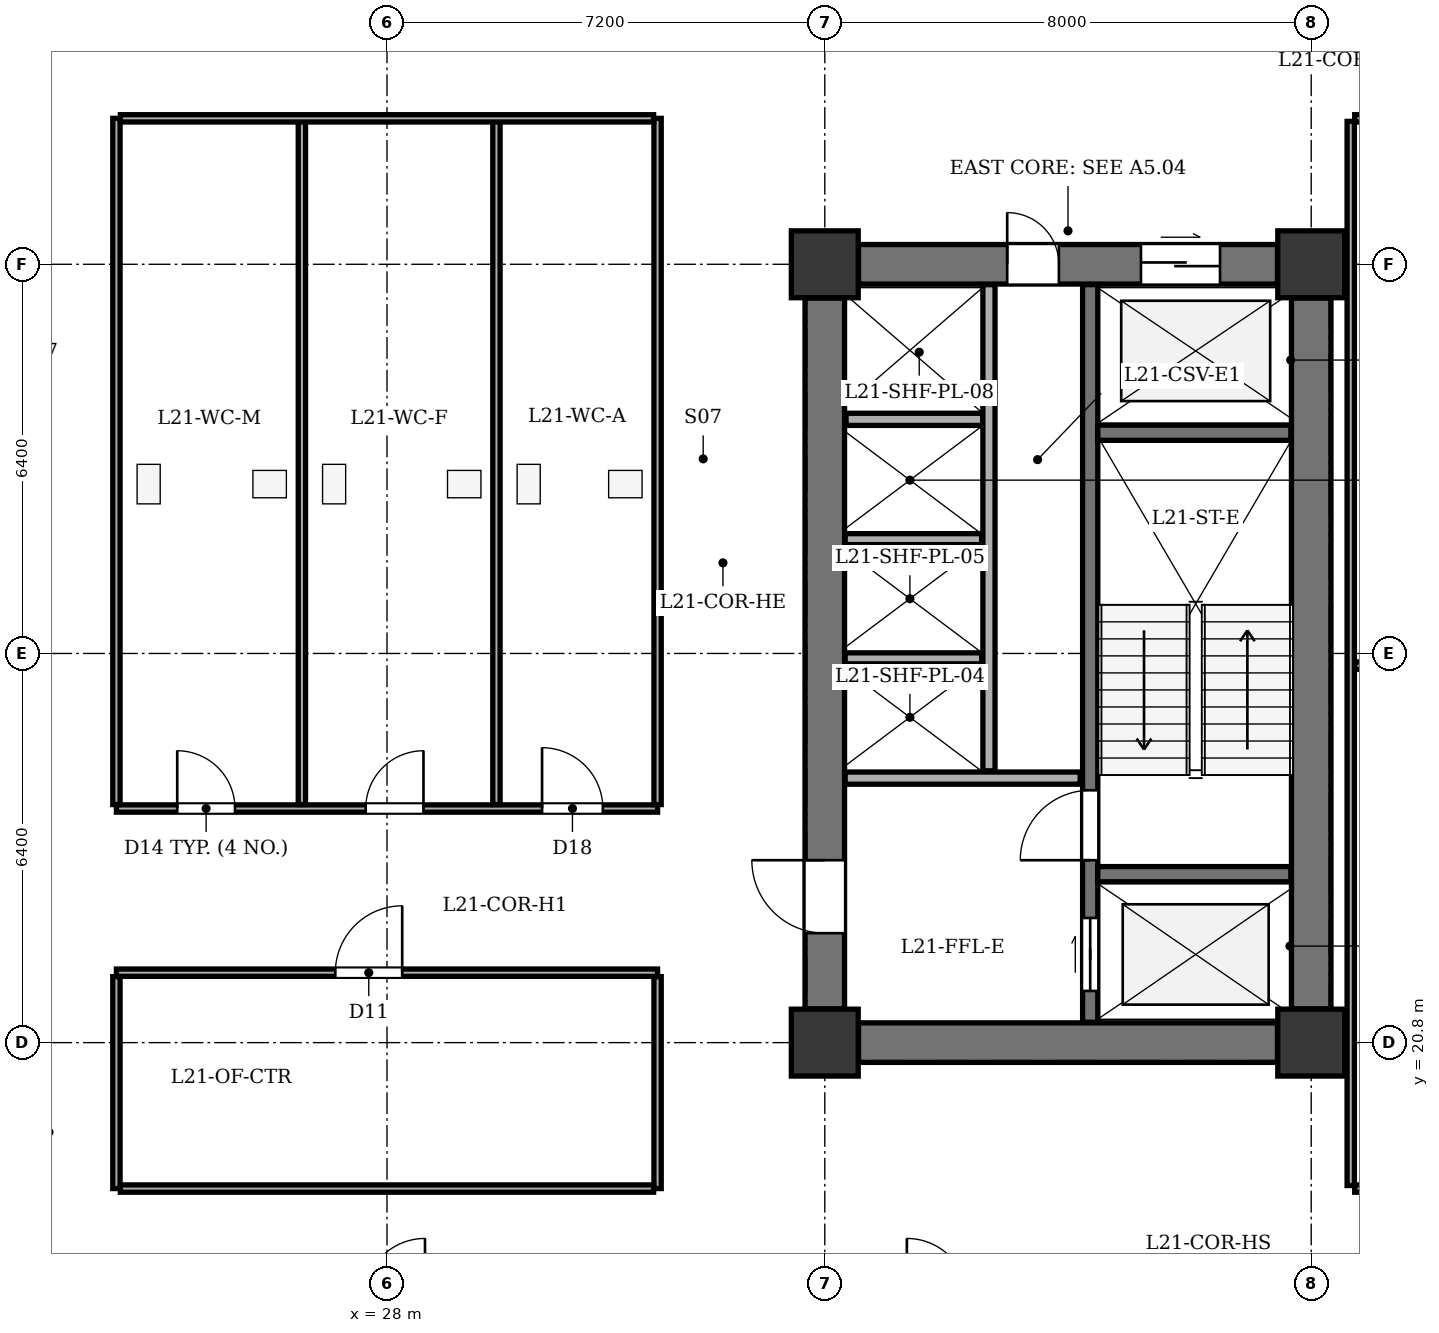
"""IFC4 building model, lengths in metres.
Left out: names, types, materials, properties, quantities, classifications, styles, units other than length and angle.
Written with IfcOpenShell. Run it as: python <this file> out.ifc"""

import sys

from ifc_helpers import new_model, si_unit, direction, frame, frame_2d, origin, origin_2d, place, context, subcontext, project, spatial, rectangle, extrude, element, fill, save


model = new_model("IFC4")
c1 = context("Model", 3, precision=1e-05, world=origin(), true_north=direction((0.0, 1.0)))
c2 = subcontext(c1, "Body", "Model", "MODEL_VIEW")
j1 = project(units=[si_unit("LENGTHUNIT", "METRE"), si_unit("PLANEANGLEUNIT", "RADIAN")], contexts=[c1])
p1 = place(None, origin())
s1 = spatial("IfcSite", under=j1, at=p1, CompositionType="ELEMENT")
p2 = place(p1, origin())
s2 = spatial("IfcBuilding", under=s1, at=p2, CompositionType="ELEMENT")
p3 = place(p2, frame((0.0, 0.0, 86.7)))
s3 = spatial("IfcBuildingStorey", under=s2, at=p3, CompositionType="ELEMENT", Elevation=86.7)
for number, where, z_axis, x_axis in (
    (1, (35.2, 20.8, 0.0), (0.0, 0.0, 1.0), (1.0, 0.0, 0.0)),
    (2, (43.2, 20.8, 0.0), (0.0, 0.0, 1.0), (1.0, 0.0, 0.0)),
    (3, (35.2, 33.6, 0.0), (0.0, 0.0, 1.0), (1.0, 0.0, 0.0)),
    (4, (43.2, 33.6, 0.0), (0.0, 0.0, 1.0), (1.0, 0.0, 0.0)),
):
    element("IfcColumn", number, at=place(p3, frame(where, z_axis=z_axis, x_axis=x_axis)), inside=s3, PredefinedType="COLUMN", context=c2, shape_type="SweptSolid", body=[
        extrude(rectangle(XDim=1.1, YDim=1.1, at=origin_2d()), origin(), (0.0, 0.0, 1.0), 3.9),
    ])
p4 = place(p3, frame((43.2, 21.355, 0.0), z_axis=(0.0, 0.0, 1.0), x_axis=(0.0, 1.0, 0.0)))
e5 = element("IfcWall", 5, at=p4, inside=s3, PredefinedType="SHEAR", context=c2, shape_type="SweptSolid", body=[
    extrude(rectangle(XDim=11.69, YDim=0.65, at=frame_2d((5.845, 0.0))), origin(), (0.0, 0.0, 1.0), 3.6),
])
p5 = place(p3, frame((35.755, 20.8, 0.0), z_axis=(0.0, 0.0, 1.0), x_axis=(1.0, 0.0, 0.0)))
e6 = element("IfcWall", 6, at=p5, inside=s3, PredefinedType="SHEAR", context=c2, shape_type="SweptSolid", body=[
    extrude(rectangle(XDim=6.89, YDim=0.65, at=frame_2d((3.445, 0.0))), origin(), (0.0, 0.0, 1.0), 3.6),
])
p6 = place(p3, frame((35.755, 33.6, 0.0), z_axis=(0.0, 0.0, 1.0), x_axis=(1.0, 0.0, 0.0)))
e7 = element("IfcWall", 7, at=p6, inside=s3, PredefinedType="SHEAR", context=c2, shape_type="SweptSolid", body=[
    extrude(rectangle(XDim=6.89, YDim=0.65, at=frame_2d((3.445, 0.0))), origin(), (0.0, 0.0, 1.0), 3.6),
])
p7 = place(p6, frame((4.645, 0.0, 0.0)))
e8 = element("IfcOpeningElement", 8, at=p7, cuts=e7, PredefinedType="OPENING", context=c2, shape_type="SweptSolid", body=[
    extrude(rectangle(XDim=1.3, YDim=2.15, at=frame_2d((0.65, 1.075))), frame((0.0, 0.335, 0.0), z_axis=(0.0, -1.0, 0.0), x_axis=(1.0, 0.0, 0.0)), (0.0, 0.0, 1.0), 0.67),
])
p8 = place(p6, frame((2.445, 0.0, 0.0)))
e9 = element("IfcOpeningElement", 9, at=p8, cuts=e7, PredefinedType="OPENING", context=c2, shape_type="SweptSolid", body=[
    extrude(rectangle(XDim=0.85, YDim=2.02, at=frame_2d((0.425, 1.01))), frame((0.0, 0.335, 0.0), z_axis=(0.0, -1.0, 0.0), x_axis=(1.0, 0.0, 0.0)), (0.0, 0.0, 1.0), 0.67),
])
p9 = place(p3, frame((35.2, 21.355, 0.0), z_axis=(0.0, 0.0, 1.0), x_axis=(0.0, 1.0, 0.0)))
e10 = element("IfcWall", 10, at=p9, inside=s3, PredefinedType="SHEAR", context=c2, shape_type="SweptSolid", body=[
    extrude(rectangle(XDim=11.69, YDim=0.65, at=frame_2d((5.845, 0.0))), origin(), (0.0, 0.0, 1.0), 3.6),
])
p10 = place(p9, frame((1.245, 0.0, 0.0)))
e11 = element("IfcOpeningElement", 11, at=p10, cuts=e10, PredefinedType="OPENING", context=c2, shape_type="SweptSolid", body=[
    extrude(rectangle(XDim=1.2, YDim=2.15, at=frame_2d((0.6, 1.075))), frame((0.0, 0.335, 0.0), z_axis=(0.0, -1.0, 0.0), x_axis=(1.0, 0.0, 0.0)), (0.0, 0.0, 1.0), 0.67),
])
p11 = place(p3, frame((39.565, 21.135, 0.0), z_axis=(0.0, 0.0, 1.0), x_axis=(0.0, 1.0, 0.0)))
e12 = element("IfcWall", 12, at=p11, inside=s3, PredefinedType="SHEAR", context=c2, shape_type="SweptSolid", body=[
    extrude(rectangle(XDim=12.13, YDim=0.25, at=frame_2d((6.065, 0.0))), origin(), (0.0, 0.0, 1.0), 3.6),
])
p12 = place(p11, frame((0.515, 0.0, 0.0)))
e13 = element("IfcOpeningElement", 13, at=p12, cuts=e12, PredefinedType="OPENING", context=c2, shape_type="SweptSolid", body=[
    extrude(rectangle(XDim=1.2, YDim=2.15, at=frame_2d((0.6, 1.075))), frame((0.0, 0.135, 0.0), z_axis=(0.0, -1.0, 0.0), x_axis=(1.0, 0.0, 0.0)), (0.0, 0.0, 1.0), 0.27),
])
p13 = place(p11, frame((2.665, 0.0, 0.0)))
e14 = element("IfcOpeningElement", 14, at=p13, cuts=e12, PredefinedType="OPENING", context=c2, shape_type="SweptSolid", body=[
    extrude(rectangle(XDim=1.15, YDim=2.15, at=frame_2d((0.575, 1.075))), frame((0.0, 0.135, 0.0), z_axis=(0.0, -1.0, 0.0), x_axis=(1.0, 0.0, 0.0)), (0.0, 0.0, 1.0), 0.27),
])
for number, where, z_axis, x_axis in (
    (15, (39.69, 23.57, 0.0), (0.0, 0.0, 1.0), (1.0, 0.0, 0.0)),
    (16, (39.69, 30.83, 0.0), (0.0, 0.0, 1.0), (1.0, 0.0, 0.0)),
):
    element("IfcWall", number, at=place(p3, frame(where, z_axis=z_axis, x_axis=x_axis)), inside=s3, PredefinedType="SHEAR", context=c2, shape_type="SweptSolid", body=[
        extrude(rectangle(XDim=3.175, YDim=0.25, at=frame_2d((1.587, 0.0))), origin(), (0.0, 0.0, 1.0), 3.6),
    ])
p14 = place(p3, frame((35.535, 25.15, 0.0), z_axis=(0.0, 0.0, 1.0), x_axis=(1.0, 0.0, 0.0)))
e17 = element("IfcWall", 17, at=p14, inside=s3, PredefinedType="SOLIDWALL", context=c2, shape_type="SweptSolid", body=[
    extrude(rectangle(XDim=3.865, YDim=0.2, at=frame_2d((1.933, 0.0))), origin(), (0.0, 0.0, 1.0), 3.6),
])
p15 = place(p3, frame((35.55, 31.05, 0.0), z_axis=(0.0, 0.0, 1.0), x_axis=(1.0, 0.0, 0.0)))
e18 = element("IfcWall", 18, at=p15, inside=s3, PredefinedType="SOLIDWALL", context=c2, shape_type="SweptSolid", body=[
    extrude(rectangle(XDim=2.25, YDim=0.2, at=frame_2d((1.125, 0.0))), origin(), (0.0, 0.0, 1.0), 3.6),
])
p16 = place(p3, frame((37.9, 25.27, 0.0), z_axis=(0.0, 0.0, 1.0), x_axis=(0.0, 1.0, 0.0)))
e19 = element("IfcWall", 19, at=p16, inside=s3, PredefinedType="SOLIDWALL", context=c2, shape_type="SweptSolid", body=[
    extrude(rectangle(XDim=7.995, YDim=0.2, at=frame_2d((3.998, 0.0))), origin(), (0.0, 0.0, 1.0), 3.6),
])
for number, where, z_axis, x_axis in (
    (20, (35.535, 27.12, 0.0), (0.0, 0.0, 1.0), (1.0, 0.0, 0.0)),
    (21, (35.535, 29.08, 0.0), (0.0, 0.0, 1.0), (1.0, 0.0, 0.0)),
):
    element("IfcWall", number, at=place(p3, frame(where, z_axis=z_axis, x_axis=x_axis)), inside=s3, PredefinedType="PARTITIONING", context=c2, shape_type="SweptSolid", body=[
        extrude(rectangle(XDim=2.245, YDim=0.18, at=frame_2d((1.123, 0.0))), origin(), (0.0, 0.0, 1.0), 3.6),
    ])
p17 = place(p3, frame((23.55, 24.65, 0.0), z_axis=(0.0, 0.0, 1.0), x_axis=(1.0, 0.0, 0.0)))
e22 = element("IfcWall", 22, at=p17, inside=s3, PredefinedType="PARTITIONING", context=c2, shape_type="SweptSolid", body=[
    extrude(rectangle(XDim=8.9, YDim=0.12, at=frame_2d((4.45, 0.0))), origin(), (0.0, 0.0, 1.0), 3.135),
])
p18 = place(p17, frame((1.0, 0.0, 0.0)))
e23 = element("IfcOpeningElement", 23, at=p18, cuts=e22, PredefinedType="OPENING", context=c2, shape_type="SweptSolid", body=[
    extrude(rectangle(XDim=0.95, YDim=2.1, at=frame_2d((0.475, 1.05))), frame((0.0, 0.07, 0.0), z_axis=(0.0, -1.0, 0.0), x_axis=(1.0, 0.0, 0.0)), (0.0, 0.0, 1.0), 0.14),
])
p19 = place(p17, frame((4.1, 0.0, 0.0)))
e24 = element("IfcOpeningElement", 24, at=p19, cuts=e22, PredefinedType="OPENING", context=c2, shape_type="SweptSolid", body=[
    extrude(rectangle(XDim=0.95, YDim=2.1, at=frame_2d((0.475, 1.05))), frame((0.0, 0.07, 0.0), z_axis=(0.0, -1.0, 0.0), x_axis=(1.0, 0.0, 0.0)), (0.0, 0.0, 1.0), 0.14),
])
p20 = place(p17, frame((7.0, 0.0, 0.0)))
e25 = element("IfcOpeningElement", 25, at=p20, cuts=e22, PredefinedType="OPENING", context=c2, shape_type="SweptSolid", body=[
    extrude(rectangle(XDim=1.0, YDim=2.1, at=frame_2d((0.5, 1.05))), frame((0.0, 0.07, 0.0), z_axis=(0.0, -1.0, 0.0), x_axis=(1.0, 0.0, 0.0)), (0.0, 0.0, 1.0), 0.14),
])
for number, where, z_axis, x_axis in (
    (26, (23.55, 24.715, 0.0), (0.0, 0.0, 1.0), (0.0, 1.0, 0.0)),
    (27, (32.45, 24.715, 0.0), (0.0, 0.0, 1.0), (0.0, 1.0, 0.0)),
    (28, (26.6, 24.715, 0.0), (0.0, 0.0, 1.0), (0.0, 1.0, 0.0)),
):
    element("IfcWall", number, at=place(p3, frame(where, z_axis=z_axis, x_axis=x_axis)), inside=s3, PredefinedType="PARTITIONING", context=c2, shape_type="SweptSolid", body=[
        extrude(rectangle(XDim=11.285, YDim=0.12, at=frame_2d((5.643, 0.0))), origin(), (0.0, 0.0, 1.0), 3.6),
    ])
p21 = place(p3, frame((29.8, 24.715, 0.0), z_axis=(0.0, 0.0, 1.0), x_axis=(0.0, 1.0, 0.0)))
e29 = element("IfcWall", 29, at=p21, inside=s3, PredefinedType="PARTITIONING", context=c2, shape_type="SweptSolid", body=[
    extrude(rectangle(XDim=11.285, YDim=0.12, at=frame_2d((5.643, 0.0))), origin(), (0.0, 0.0, 1.0), 3.135),
])
p22 = place(p3, frame((23.615, 36.0, 0.0), z_axis=(0.0, 0.0, 1.0), x_axis=(1.0, 0.0, 0.0)))
e30 = element("IfcWall", 30, at=p22, inside=s3, PredefinedType="PARTITIONING", context=c2, shape_type="SweptSolid", body=[
    extrude(rectangle(XDim=8.77, YDim=0.12, at=frame_2d((4.385, 0.0))), origin(), (0.0, 0.0, 1.0), 3.6),
])
p23 = place(p3, frame((23.55, 21.95, 0.0), z_axis=(0.0, 0.0, 1.0), x_axis=(1.0, 0.0, 0.0)))
e31 = element("IfcWall", 31, at=p23, inside=s3, PredefinedType="PARTITIONING", context=c2, shape_type="SweptSolid", body=[
    extrude(rectangle(XDim=8.9, YDim=0.12, at=frame_2d((4.45, 0.0))), origin(), (0.0, 0.0, 1.0), 3.135),
])
p24 = place(p23, frame((3.6, 0.0, 0.0)))
e32 = element("IfcOpeningElement", 32, at=p24, cuts=e31, PredefinedType="OPENING", context=c2, shape_type="SweptSolid", body=[
    extrude(rectangle(XDim=1.1, YDim=2.15, at=frame_2d((0.55, 1.075))), frame((0.0, 0.07, 0.0), z_axis=(0.0, -1.0, 0.0), x_axis=(1.0, 0.0, 0.0)), (0.0, 0.0, 1.0), 0.14),
])
for number, where, z_axis, x_axis in (
    (33, (23.55, 18.4, 0.0), (0.0, 0.0, 1.0), (0.0, 1.0, 0.0)),
    (34, (32.45, 18.4, 0.0), (0.0, 0.0, 1.0), (0.0, 1.0, 0.0)),
):
    element("IfcWall", number, at=place(p3, frame(where, z_axis=z_axis, x_axis=x_axis)), inside=s3, PredefinedType="PARTITIONING", context=c2, shape_type="SweptSolid", body=[
        extrude(rectangle(XDim=3.485, YDim=0.12, at=frame_2d((1.743, 0.0))), origin(), (0.0, 0.0, 1.0), 3.6),
    ])
p25 = place(p3, frame((23.615, 18.4, 0.0), z_axis=(0.0, 0.0, 1.0), x_axis=(1.0, 0.0, 0.0)))
e35 = element("IfcWall", 35, at=p25, inside=s3, PredefinedType="PARTITIONING", context=c2, shape_type="SweptSolid", body=[
    extrude(rectangle(XDim=8.77, YDim=0.12, at=frame_2d((4.385, 0.0))), origin(), (0.0, 0.0, 1.0), 3.6),
])
p26 = place(p3, frame((43.85, 18.45, 0.0), z_axis=(0.0, 0.0, 1.0), x_axis=(0.0, 1.0, 0.0)))
e36 = element("IfcWall", 36, at=p26, inside=s3, PredefinedType="PARTITIONING", context=c2, shape_type="SweptSolid", body=[
    extrude(rectangle(XDim=17.5, YDim=0.12, at=frame_2d((8.75, 0.0))), origin(), (0.0, 0.0, 1.0), 3.6),
])
p27 = place(p3, frame((43.915, 18.4, 0.0), z_axis=(0.0, 0.0, 1.0), x_axis=(1.0, 0.0, 0.0)))
e37 = element("IfcWall", 37, at=p27, inside=s3, PredefinedType="PARTITIONING", context=c2, shape_type="SweptSolid", body=[
    extrude(rectangle(XDim=11.38, YDim=0.12, at=frame_2d((5.69, 0.0))), origin(), (0.0, 0.0, 1.0), 3.6),
])
p28 = place(p27, frame((1.485, 0.0, 0.0)))
e38 = element("IfcOpeningElement", 38, at=p28, cuts=e37, PredefinedType="OPENING", context=c2, shape_type="SweptSolid", body=[
    extrude(rectangle(XDim=0.95, YDim=2.1, at=frame_2d((0.475, 1.05))), frame((0.0, 0.07, 0.0), z_axis=(0.0, -1.0, 0.0), x_axis=(1.0, 0.0, 0.0)), (0.0, 0.0, 1.0), 0.14),
])
p29 = place(p3, frame((43.915, 36.0, 0.0), z_axis=(0.0, 0.0, 1.0), x_axis=(1.0, 0.0, 0.0)))
e39 = element("IfcWall", 39, at=p29, inside=s3, PredefinedType="PARTITIONING", context=c2, shape_type="SweptSolid", body=[
    extrude(rectangle(XDim=11.38, YDim=0.12, at=frame_2d((5.69, 0.0))), origin(), (0.0, 0.0, 1.0), 3.6),
])
p30 = place(p29, frame((1.485, 0.0, 0.0)))
e40 = element("IfcOpeningElement", 40, at=p30, cuts=e39, PredefinedType="OPENING", context=c2, shape_type="SweptSolid", body=[
    extrude(rectangle(XDim=0.95, YDim=2.1, at=frame_2d((0.475, 1.05))), frame((0.0, 0.07, 0.0), z_axis=(0.0, -1.0, 0.0), x_axis=(1.0, 0.0, 0.0)), (0.0, 0.0, 1.0), 0.14),
])
p31 = place(p3, frame((43.915, 27.0, 0.0), z_axis=(0.0, 0.0, 1.0), x_axis=(1.0, 0.0, 0.0)))
e41 = element("IfcWall", 41, at=p31, inside=s3, PredefinedType="PARTITIONING", context=c2, shape_type="SweptSolid", body=[
    extrude(rectangle(XDim=11.38, YDim=0.12, at=frame_2d((5.69, 0.0))), origin(), (0.0, 0.0, 1.0), 3.6),
])
p32 = place(p31, frame((1.985, 0.0, 0.0)))
e42 = element("IfcOpeningElement", 42, at=p32, cuts=e41, PredefinedType="OPENING", context=c2, shape_type="SweptSolid", body=[
    extrude(rectangle(XDim=0.9, YDim=2.05, at=frame_2d((0.45, 1.025))), frame((0.0, 0.07, 0.0), z_axis=(0.0, -1.0, 0.0), x_axis=(1.0, 0.0, 0.0)), (0.0, 0.0, 1.0), 0.14),
])
p33 = place(p7, origin())
e43 = element("IfcDoor", 43, at=p33, inside=s3, OperationType="DOUBLE_DOOR_SLIDING", PredefinedType="DOOR", context=c2, shape_type="SweptSolid", body=[
    extrude(rectangle(XDim=1.3, YDim=2.15, at=frame_2d((0.65, 1.075))), frame((0.0, 0.025, 0.0), z_axis=(0.0, -1.0, 0.0), x_axis=(1.0, 0.0, 0.0)), (0.0, 0.0, 1.0), 0.05),
])
fill(e8, e43)
p34 = place(p8, origin())
e44 = element("IfcDoor", 44, at=p34, inside=s3, OperationType="SINGLE_SWING_LEFT", PredefinedType="DOOR", context=c2, shape_type="SweptSolid", body=[
    extrude(rectangle(XDim=0.85, YDim=2.02, at=frame_2d((0.425, 1.01))), frame((0.0, 0.025, 0.0), z_axis=(0.0, -1.0, 0.0), x_axis=(1.0, 0.0, 0.0)), (0.0, 0.0, 1.0), 0.05),
])
fill(e9, e44)
p35 = place(p10, origin())
e45 = element("IfcDoor", 45, at=p35, inside=s3, OperationType="SINGLE_SWING_RIGHT", PredefinedType="DOOR", context=c2, shape_type="SweptSolid", body=[
    extrude(rectangle(XDim=1.2, YDim=2.15, at=frame_2d((0.6, 1.075))), frame((0.0, 0.025, 0.0), z_axis=(0.0, -1.0, 0.0), x_axis=(1.0, 0.0, 0.0)), (0.0, 0.0, 1.0), 0.05),
])
fill(e11, e45)
p36 = place(p12, origin())
e46 = element("IfcDoor", 46, at=p36, inside=s3, OperationType="DOUBLE_DOOR_SLIDING", PredefinedType="DOOR", context=c2, shape_type="SweptSolid", body=[
    extrude(rectangle(XDim=1.2, YDim=2.15, at=frame_2d((0.6, 1.075))), frame((0.0, 0.025, 0.0), z_axis=(0.0, -1.0, 0.0), x_axis=(1.0, 0.0, 0.0)), (0.0, 0.0, 1.0), 0.05),
])
fill(e13, e46)
p37 = place(p13, origin())
e47 = element("IfcDoor", 47, at=p37, inside=s3, OperationType="SINGLE_SWING_LEFT", PredefinedType="DOOR", context=c2, shape_type="SweptSolid", body=[
    extrude(rectangle(XDim=1.15, YDim=2.15, at=frame_2d((0.575, 1.075))), frame((0.0, 0.025, 0.0), z_axis=(0.0, -1.0, 0.0), x_axis=(1.0, 0.0, 0.0)), (0.0, 0.0, 1.0), 0.05),
])
fill(e14, e47)
p38 = place(p18, origin())
e48 = element("IfcDoor", 48, at=p38, inside=s3, OperationType="SINGLE_SWING_LEFT", PredefinedType="DOOR", context=c2, shape_type="SweptSolid", body=[
    extrude(rectangle(XDim=0.95, YDim=2.1, at=frame_2d((0.475, 1.05))), frame((0.0, 0.025, 0.0), z_axis=(0.0, -1.0, 0.0), x_axis=(1.0, 0.0, 0.0)), (0.0, 0.0, 1.0), 0.05),
])
fill(e23, e48)
p39 = place(p19, origin())
e49 = element("IfcDoor", 49, at=p39, inside=s3, OperationType="SINGLE_SWING_RIGHT", PredefinedType="DOOR", context=c2, shape_type="SweptSolid", body=[
    extrude(rectangle(XDim=0.95, YDim=2.1, at=frame_2d((0.475, 1.05))), frame((0.0, 0.025, 0.0), z_axis=(0.0, -1.0, 0.0), x_axis=(1.0, 0.0, 0.0)), (0.0, 0.0, 1.0), 0.05),
])
fill(e24, e49)
p40 = place(p20, origin())
e50 = element("IfcDoor", 50, at=p40, inside=s3, OperationType="SINGLE_SWING_LEFT", PredefinedType="DOOR", context=c2, shape_type="SweptSolid", body=[
    extrude(rectangle(XDim=1.0, YDim=2.1, at=frame_2d((0.5, 1.05))), frame((0.0, 0.025, 0.0), z_axis=(0.0, -1.0, 0.0), x_axis=(1.0, 0.0, 0.0)), (0.0, 0.0, 1.0), 0.05),
])
fill(e25, e50)
p41 = place(p24, origin())
e51 = element("IfcDoor", 51, at=p41, inside=s3, OperationType="SINGLE_SWING_RIGHT", PredefinedType="DOOR", context=c2, shape_type="SweptSolid", body=[
    extrude(rectangle(XDim=1.1, YDim=2.15, at=frame_2d((0.55, 1.075))), frame((0.0, 0.025, 0.0), z_axis=(0.0, -1.0, 0.0), x_axis=(1.0, 0.0, 0.0)), (0.0, 0.0, 1.0), 0.05),
])
fill(e32, e51)
save(model, sys.argv[1])
